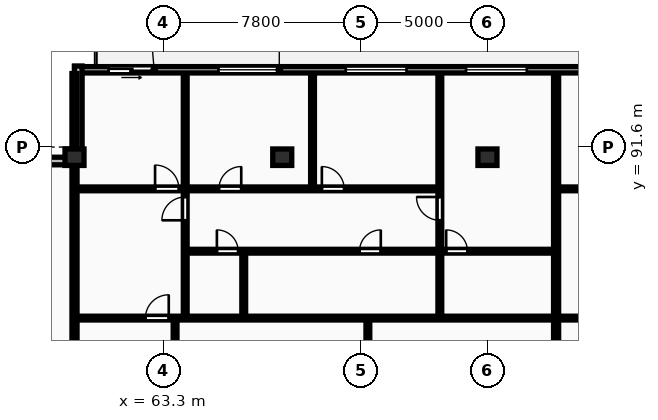
"""IFC4 building model, lengths in metres.
Left out: names, types, materials, properties, quantities, classifications, styles, units other than length and angle.
Written with IfcOpenShell. Run it as: python <this file> out.ifc"""

import sys

from ifc_helpers import new_model, si_unit, direction, frame, frame_2d, origin, origin_2d, place, context, subcontext, project, spatial, rectangle, extrude, element, fill, save


model = new_model("IFC4")
c1 = context("Model", 3, precision=1e-05, world=origin(), true_north=direction((0.0, 1.0)))
c2 = subcontext(c1, "Body", "Model", "MODEL_VIEW")
j1 = project(units=[si_unit("LENGTHUNIT", "METRE"), si_unit("PLANEANGLEUNIT", "RADIAN")], contexts=[c1])
p1 = place(None, origin())
s1 = spatial("IfcSite", under=j1, at=p1, CompositionType="ELEMENT")
p2 = place(p1, origin())
s2 = spatial("IfcBuilding", under=s1, at=p2, CompositionType="ELEMENT")
p3 = place(p2, frame((0.0, 0.0, 249.35)))
s3 = spatial("IfcBuildingStorey", under=s2, at=p3, CompositionType="ELEMENT", Elevation=249.35)
for number, where, z_axis, x_axis in (
    (1, (59.8, 91.2, 0.0), (0.0, 0.0, 1.0), (1.0, 0.0, 0.0)),
    (2, (68.0, 91.2, 0.0), (0.0, 0.0, 1.0), (1.0, 0.0, 0.0)),
    (3, (76.1, 91.2, 0.0), (0.0, 0.0, 1.0), (1.0, 0.0, 0.0)),
):
    element("IfcColumn", number, at=place(p3, frame(where, z_axis=z_axis, x_axis=x_axis)), inside=s3, PredefinedType="COLUMN", context=c2, shape_type="SweptSolid", body=[
        extrude(rectangle(XDim=0.75, YDim=0.65, at=origin_2d()), origin(), (0.0, 0.0, 1.0), 3.45),
    ])
p4 = place(p3, frame((128.4, 94.65, 0.0), z_axis=(0.0, 0.0, 1.0), x_axis=(-1.0, 0.0, 0.0)))
e4 = element("IfcWall", 4, at=p4, inside=s3, PredefinedType="STANDARD", context=c2, shape_type="SweptSolid", body=[
    extrude(rectangle(XDim=68.6, YDim=0.25, at=frame_2d((34.3, 0.0))), origin(), (0.0, 0.0, 1.0), 3.17),
])
p5 = place(p4, frame((60.518, 0.0, 0.85)))
e5 = element("IfcOpeningElement", 5, at=p5, cuts=e4, PredefinedType="OPENING", context=c2, shape_type="SweptSolid", body=[
    extrude(rectangle(XDim=2.4, YDim=1.9, at=frame_2d((1.2, 0.95))), frame((0.0, 0.135, 0.0), z_axis=(0.0, -1.0, 0.0), x_axis=(1.0, 0.0, 0.0)), (0.0, 0.0, 1.0), 0.27),
])
p6 = place(p4, frame((55.492, 0.0, 0.85)))
e6 = element("IfcOpeningElement", 6, at=p6, cuts=e4, PredefinedType="OPENING", context=c2, shape_type="SweptSolid", body=[
    extrude(rectangle(XDim=2.4, YDim=1.9, at=frame_2d((1.2, 0.95))), frame((0.0, 0.135, 0.0), z_axis=(0.0, -1.0, 0.0), x_axis=(1.0, 0.0, 0.0)), (0.0, 0.0, 1.0), 0.27),
])
p7 = place(p4, frame((65.455, 0.0, 0.0)))
e7 = element("IfcOpeningElement", 7, at=p7, cuts=e4, PredefinedType="OPENING", context=c2, shape_type="SweptSolid", body=[
    extrude(rectangle(XDim=1.8, YDim=2.2, at=frame_2d((0.9, 1.1))), frame((0.0, 0.135, 0.0), z_axis=(0.0, -1.0, 0.0), x_axis=(1.0, 0.0, 0.0)), (0.0, 0.0, 1.0), 0.27),
])
p8 = place(p4, frame((50.746, 0.0, 0.85)))
e8 = element("IfcOpeningElement", 8, at=p8, cuts=e4, PredefinedType="OPENING", context=c2, shape_type="SweptSolid", body=[
    extrude(rectangle(XDim=2.4, YDim=1.9, at=frame_2d((1.2, 0.95))), frame((0.0, 0.135, 0.0), z_axis=(0.0, -1.0, 0.0), x_axis=(1.0, 0.0, 0.0)), (0.0, 0.0, 1.0), 0.27),
])
p9 = place(p4, frame((39.76, 0.0, 0.85)))
e9 = element("IfcOpeningElement", 9, at=p9, cuts=e4, PredefinedType="OPENING", context=c2, shape_type="SweptSolid", body=[
    extrude(rectangle(XDim=1.8, YDim=1.8, at=frame_2d((0.9, 0.9))), frame((0.0, 0.135, 0.0), z_axis=(0.0, -1.0, 0.0), x_axis=(1.0, 0.0, 0.0)), (0.0, 0.0, 1.0), 0.27),
])
p10 = place(p4, frame((37.04, 0.0, 0.85)))
e10 = element("IfcOpeningElement", 10, at=p10, cuts=e4, PredefinedType="OPENING", context=c2, shape_type="SweptSolid", body=[
    extrude(rectangle(XDim=1.8, YDim=1.8, at=frame_2d((0.9, 0.9))), frame((0.0, 0.135, 0.0), z_axis=(0.0, -1.0, 0.0), x_axis=(1.0, 0.0, 0.0)), (0.0, 0.0, 1.0), 0.27),
])
p11 = place(p4, frame((44.845, 0.0, 0.0)))
e11 = element("IfcOpeningElement", 11, at=p11, cuts=e4, PredefinedType="OPENING", context=c2, shape_type="SweptSolid", body=[
    extrude(rectangle(XDim=1.8, YDim=2.2, at=frame_2d((0.9, 1.1))), frame((0.0, 0.135, 0.0), z_axis=(0.0, -1.0, 0.0), x_axis=(1.0, 0.0, 0.0)), (0.0, 0.0, 1.0), 0.27),
])
p12 = place(p4, frame((33.056, 0.0, 0.85)))
e12 = element("IfcOpeningElement", 12, at=p12, cuts=e4, PredefinedType="OPENING", context=c2, shape_type="SweptSolid", body=[
    extrude(rectangle(XDim=2.4, YDim=1.9, at=frame_2d((1.2, 0.95))), frame((0.0, 0.135, 0.0), z_axis=(0.0, -1.0, 0.0), x_axis=(1.0, 0.0, 0.0)), (0.0, 0.0, 1.0), 0.27),
])
p13 = place(p4, frame((27.394, 0.0, 0.0)))
e13 = element("IfcOpeningElement", 13, at=p13, cuts=e4, PredefinedType="OPENING", context=c2, shape_type="SweptSolid", body=[
    extrude(rectangle(XDim=1.8, YDim=2.2, at=frame_2d((0.9, 1.1))), frame((0.0, 0.135, 0.0), z_axis=(0.0, -1.0, 0.0), x_axis=(1.0, 0.0, 0.0)), (0.0, 0.0, 1.0), 0.27),
])
p14 = place(p4, frame((18.879, 0.0, 0.85)))
e14 = element("IfcOpeningElement", 14, at=p14, cuts=e4, PredefinedType="OPENING", context=c2, shape_type="SweptSolid", body=[
    extrude(rectangle(XDim=2.4, YDim=1.9, at=frame_2d((1.2, 0.95))), frame((0.0, 0.135, 0.0), z_axis=(0.0, -1.0, 0.0), x_axis=(1.0, 0.0, 0.0)), (0.0, 0.0, 1.0), 0.27),
])
p15 = place(p4, frame((11.048, 0.0, 0.0)))
e15 = element("IfcOpeningElement", 15, at=p15, cuts=e4, PredefinedType="OPENING", context=c2, shape_type="SweptSolid", body=[
    extrude(rectangle(XDim=1.8, YDim=2.2, at=frame_2d((0.9, 1.1))), frame((0.0, 0.135, 0.0), z_axis=(0.0, -1.0, 0.0), x_axis=(1.0, 0.0, 0.0)), (0.0, 0.0, 1.0), 0.27),
])
p16 = place(p4, frame((3.298, 0.0, 0.85)))
e16 = element("IfcOpeningElement", 16, at=p16, cuts=e4, PredefinedType="OPENING", context=c2, shape_type="SweptSolid", body=[
    extrude(rectangle(XDim=2.4, YDim=1.9, at=frame_2d((1.2, 0.95))), frame((0.0, 0.135, 0.0), z_axis=(0.0, -1.0, 0.0), x_axis=(1.0, 0.0, 0.0)), (0.0, 0.0, 1.0), 0.27),
])
for number, where, z_axis, x_axis in (
    (17, (59.95, 94.8, 0.0), (0.0, 0.0, 1.0), (0.0, -1.0, 0.0)),
    (18, (59.8, 91.05, 0.0), (0.0, 0.0, 1.0), (-1.0, 0.0, 0.0)),
):
    element("IfcWall", number, at=place(p3, frame(where, z_axis=z_axis, x_axis=x_axis)), inside=s3, PredefinedType="STANDARD", context=c2, shape_type="SweptSolid", body=[
        extrude(rectangle(XDim=3.6, YDim=0.3, at=frame_2d((1.8, 0.0))), origin(), (0.0, 0.0, 1.0), 3.17),
    ])
p17 = place(p3, frame((59.8, 70.18, 0.0), z_axis=(0.0, 0.0, 1.0), x_axis=(0.0, 1.0, 0.0)))
e19 = element("IfcWall", 19, at=p17, inside=s3, PredefinedType="PARTITIONING", context=c2, shape_type="SweptSolid", body=[
    extrude(rectangle(XDim=24.32, YDim=0.2, at=frame_2d((12.16, 0.0))), origin(), (0.0, 0.0, 1.0), 2.477),
])
p18 = place(p3, frame((78.809, 70.18, 0.0), z_axis=(0.0, 0.0, 1.0), x_axis=(0.0, 1.0, 0.0)))
e20 = element("IfcWall", 20, at=p18, inside=s3, PredefinedType="PARTITIONING", context=c2, shape_type="SweptSolid", body=[
    extrude(rectangle(XDim=24.32, YDim=0.2, at=frame_2d((12.16, 0.0))), origin(), (0.0, 0.0, 1.0), 3.17),
])
p19 = place(p3, frame((71.379, 70.16, 0.0), z_axis=(0.0, 0.0, 1.0), x_axis=(0.0, 1.0, 0.0)))
e21 = element("IfcWall", 21, at=p19, inside=s3, PredefinedType="PARTITIONING", context=c2, shape_type="SweptSolid", body=[
    extrude(rectangle(XDim=14.65, YDim=0.15, at=frame_2d((7.325, 0.0))), origin(), (0.0, 0.0, 1.0), 3.17),
])
p20 = place(p19, frame((6.235, 0.0, 0.0)))
e22 = element("IfcOpeningElement", 22, at=p20, cuts=e21, PredefinedType="OPENING", context=c2, shape_type="SweptSolid", body=[
    extrude(rectangle(XDim=0.84, YDim=2.04, at=frame_2d((0.42, 1.02))), frame((0.0, 0.085, 0.0), z_axis=(0.0, -1.0, 0.0), x_axis=(1.0, 0.0, 0.0)), (0.0, 0.0, 1.0), 0.17),
])
p21 = place(p19, frame((7.575, 0.0, 0.0)))
e23 = element("IfcOpeningElement", 23, at=p21, cuts=e21, PredefinedType="OPENING", context=c2, shape_type="SweptSolid", body=[
    extrude(rectangle(XDim=0.88, YDim=2.06, at=frame_2d((0.44, 1.03))), frame((0.0, 0.085, 0.0), z_axis=(0.0, -1.0, 0.0), x_axis=(1.0, 0.0, 0.0)), (0.0, 0.0, 1.0), 0.17),
])
p22 = place(p3, frame((63.77, 70.16, 0.0), z_axis=(0.0, 0.0, 1.0), x_axis=(0.0, 1.0, 0.0)))
e24 = element("IfcWall", 24, at=p22, inside=s3, PredefinedType="PARTITIONING", context=c2, shape_type="SweptSolid", body=[
    extrude(rectangle(XDim=14.65, YDim=0.15, at=frame_2d((7.325, 0.0))), origin(), (0.0, 0.0, 1.0), 3.17),
])
p23 = place(p22, frame((6.195, 0.0, 0.0)))
e25 = element("IfcOpeningElement", 25, at=p23, cuts=e24, PredefinedType="OPENING", context=c2, shape_type="SweptSolid", body=[
    extrude(rectangle(XDim=0.88, YDim=2.06, at=frame_2d((0.44, 1.03))), frame((0.0, 0.085, 0.0), z_axis=(0.0, -1.0, 0.0), x_axis=(1.0, 0.0, 0.0)), (0.0, 0.0, 1.0), 0.17),
])
p24 = place(p3, frame((66.48, 84.89, 0.0), z_axis=(0.0, 0.0, 1.0), x_axis=(0.0, 1.0, 0.0)))
e26 = element("IfcWall", 26, at=p24, inside=s3, PredefinedType="PARTITIONING", context=c2, shape_type="SweptSolid", body=[
    extrude(rectangle(XDim=2.58, YDim=0.15, at=frame_2d((1.29, 0.0))), origin(), (0.0, 0.0, 1.0), 3.17),
])
p25 = place(p3, frame((69.195, 90.03, 0.0), z_axis=(0.0, 0.0, 1.0), x_axis=(0.0, 1.0, 0.0)))
e27 = element("IfcWall", 27, at=p25, inside=s3, PredefinedType="PARTITIONING", context=c2, shape_type="SweptSolid", body=[
    extrude(rectangle(XDim=4.47, YDim=0.15, at=frame_2d((2.235, 0.0))), origin(), (0.0, 0.0, 1.0), 3.17),
])
p26 = place(p3, frame((64.17, 84.89, 0.0), z_axis=(0.0, 0.0, 1.0), x_axis=(0.0, 1.0, 0.0)))
e28 = element("IfcWall", 28, at=p26, inside=s3, PredefinedType="PARTITIONING", context=c2, shape_type="SweptSolid", body=[
    extrude(rectangle(XDim=9.61, YDim=0.15, at=frame_2d((4.805, 0.0))), origin(), (0.0, 0.0, 1.0), 3.17),
])
p27 = place(p26, frame((3.82, 0.0, 0.0)))
e29 = element("IfcOpeningElement", 29, at=p27, cuts=e28, PredefinedType="OPENING", context=c2, shape_type="SweptSolid", body=[
    extrude(rectangle(XDim=0.92, YDim=2.08, at=frame_2d((0.46, 1.04))), frame((0.0, 0.085, 0.0), z_axis=(0.0, -1.0, 0.0), x_axis=(1.0, 0.0, 0.0)), (0.0, 0.0, 1.0), 0.17),
])
p28 = place(p3, frame((74.22, 84.89, 0.0), z_axis=(0.0, 0.0, 1.0), x_axis=(0.0, 1.0, 0.0)))
e30 = element("IfcWall", 30, at=p28, inside=s3, PredefinedType="PARTITIONING", context=c2, shape_type="SweptSolid", body=[
    extrude(rectangle(XDim=2.58, YDim=0.15, at=frame_2d((1.29, 0.0))), origin(), (0.0, 0.0, 1.0), 3.17),
])
p29 = place(p3, frame((74.22, 87.51, 0.0), z_axis=(0.0, 0.0, 1.0), x_axis=(0.0, 1.0, 0.0)))
e31 = element("IfcWall", 31, at=p29, inside=s3, PredefinedType="PARTITIONING", context=c2, shape_type="SweptSolid", body=[
    extrude(rectangle(XDim=6.99, YDim=0.15, at=frame_2d((3.495, 0.0))), origin(), (0.0, 0.0, 1.0), 3.17),
])
p30 = place(p29, frame((1.2, 0.0, 0.0)))
e32 = element("IfcOpeningElement", 32, at=p30, cuts=e31, PredefinedType="OPENING", context=c2, shape_type="SweptSolid", body=[
    extrude(rectangle(XDim=0.92, YDim=2.08, at=frame_2d((0.46, 1.04))), frame((0.0, 0.085, 0.0), z_axis=(0.0, -1.0, 0.0), x_axis=(1.0, 0.0, 0.0)), (0.0, 0.0, 1.0), 0.17),
])
p31 = place(p3, frame((64.21, 87.49, 0.0), z_axis=(0.0, 0.0, 1.0), x_axis=(1.0, 0.0, 0.0)))
e33 = element("IfcWall", 33, at=p31, inside=s3, PredefinedType="PARTITIONING", context=c2, shape_type="SweptSolid", body=[
    extrude(rectangle(XDim=14.519, YDim=0.15, at=frame_2d((7.26, 0.0))), origin(), (0.0, 0.0, 1.0), 3.17),
])
p32 = place(p31, frame((1.21, 0.0, 0.0)))
e34 = element("IfcOpeningElement", 34, at=p32, cuts=e33, PredefinedType="OPENING", context=c2, shape_type="SweptSolid", body=[
    extrude(rectangle(XDim=0.84, YDim=2.04, at=frame_2d((0.42, 1.02))), frame((0.0, 0.085, 0.0), z_axis=(0.0, -1.0, 0.0), x_axis=(1.0, 0.0, 0.0)), (0.0, 0.0, 1.0), 0.17),
])
p33 = place(p31, frame((6.84, 0.0, 0.0)))
e35 = element("IfcOpeningElement", 35, at=p33, cuts=e33, PredefinedType="OPENING", context=c2, shape_type="SweptSolid", body=[
    extrude(rectangle(XDim=0.84, YDim=2.04, at=frame_2d((0.42, 1.02))), frame((0.0, 0.085, 0.0), z_axis=(0.0, -1.0, 0.0), x_axis=(1.0, 0.0, 0.0)), (0.0, 0.0, 1.0), 0.17),
])
p34 = place(p31, frame((10.26, 0.0, 0.0)))
e36 = element("IfcOpeningElement", 36, at=p34, cuts=e33, PredefinedType="OPENING", context=c2, shape_type="SweptSolid", body=[
    extrude(rectangle(XDim=0.84, YDim=2.04, at=frame_2d((0.42, 1.02))), frame((0.0, 0.085, 0.0), z_axis=(0.0, -1.0, 0.0), x_axis=(1.0, 0.0, 0.0)), (0.0, 0.0, 1.0), 0.17),
])
p35 = place(p3, frame((59.88, 84.85, 0.0), z_axis=(0.0, 0.0, 1.0), x_axis=(1.0, 0.0, 0.0)))
e37 = element("IfcWall", 37, at=p35, inside=s3, PredefinedType="PARTITIONING", context=c2, shape_type="SweptSolid", body=[
    extrude(rectangle(XDim=18.849, YDim=0.15, at=frame_2d((9.425, 0.0))), origin(), (0.0, 0.0, 1.0), 3.17),
])
p36 = place(p35, frame((2.72, 0.0, 0.0)))
e38 = element("IfcOpeningElement", 38, at=p36, cuts=e37, PredefinedType="OPENING", context=c2, shape_type="SweptSolid", body=[
    extrude(rectangle(XDim=0.92, YDim=2.08, at=frame_2d((0.46, 1.04))), frame((0.0, 0.085, 0.0), z_axis=(0.0, -1.0, 0.0), x_axis=(1.0, 0.0, 0.0)), (0.0, 0.0, 1.0), 0.17),
])
p37 = place(p3, frame((59.88, 89.95, 0.0), z_axis=(0.0, 0.0, 1.0), x_axis=(1.0, 0.0, 0.0)))
e39 = element("IfcWall", 39, at=p37, inside=s3, PredefinedType="PARTITIONING", context=c2, shape_type="SweptSolid", body=[
    extrude(rectangle(XDim=14.34, YDim=0.15, at=frame_2d((7.17, 0.0))), origin(), (0.0, 0.0, 1.0), 3.17),
])
p38 = place(p37, frame((3.1, 0.0, 0.0)))
e40 = element("IfcOpeningElement", 40, at=p38, cuts=e39, PredefinedType="OPENING", context=c2, shape_type="SweptSolid", body=[
    extrude(rectangle(XDim=0.94, YDim=2.1, at=frame_2d((0.47, 1.05))), frame((0.0, 0.085, 0.0), z_axis=(0.0, -1.0, 0.0), x_axis=(1.0, 0.0, 0.0)), (0.0, 0.0, 1.0), 0.17),
])
p39 = place(p37, frame((5.622, 0.0, 0.0)))
e41 = element("IfcOpeningElement", 41, at=p39, cuts=e39, PredefinedType="OPENING", context=c2, shape_type="SweptSolid", body=[
    extrude(rectangle(XDim=0.88, YDim=2.06, at=frame_2d((0.44, 1.03))), frame((0.0, 0.085, 0.0), z_axis=(0.0, -1.0, 0.0), x_axis=(1.0, 0.0, 0.0)), (0.0, 0.0, 1.0), 0.17),
])
p40 = place(p37, frame((9.683, 0.0, 0.0)))
e42 = element("IfcOpeningElement", 42, at=p40, cuts=e39, PredefinedType="OPENING", context=c2, shape_type="SweptSolid", body=[
    extrude(rectangle(XDim=0.88, YDim=2.06, at=frame_2d((0.44, 1.03))), frame((0.0, 0.085, 0.0), z_axis=(0.0, -1.0, 0.0), x_axis=(1.0, 0.0, 0.0)), (0.0, 0.0, 1.0), 0.17),
])
p41 = place(p3, frame((78.889, 84.85, 0.0), z_axis=(0.0, 0.0, 1.0), x_axis=(1.0, 0.0, 0.0)))
e43 = element("IfcWall", 43, at=p41, inside=s3, PredefinedType="PARTITIONING", context=c2, shape_type="SweptSolid", body=[
    extrude(rectangle(XDim=17.619, YDim=0.15, at=frame_2d((8.81, 0.0))), origin(), (0.0, 0.0, 1.0), 3.17),
])
p42 = place(p41, frame((2.72, 0.0, 0.0)))
e44 = element("IfcOpeningElement", 44, at=p42, cuts=e43, PredefinedType="OPENING", context=c2, shape_type="SweptSolid", body=[
    extrude(rectangle(XDim=0.92, YDim=2.08, at=frame_2d((0.46, 1.04))), frame((0.0, 0.085, 0.0), z_axis=(0.0, -1.0, 0.0), x_axis=(1.0, 0.0, 0.0)), (0.0, 0.0, 1.0), 0.17),
])
p43 = place(p3, frame((78.889, 89.95, 0.0), z_axis=(0.0, 0.0, 1.0), x_axis=(1.0, 0.0, 0.0)))
e45 = element("IfcWall", 45, at=p43, inside=s3, PredefinedType="PARTITIONING", context=c2, shape_type="SweptSolid", body=[
    extrude(rectangle(XDim=12.931, YDim=0.15, at=frame_2d((6.465, 0.0))), origin(), (0.0, 0.0, 1.0), 3.17),
])
p44 = place(p43, frame((3.033, 0.0, 0.0)))
e46 = element("IfcOpeningElement", 46, at=p44, cuts=e45, PredefinedType="OPENING", context=c2, shape_type="SweptSolid", body=[
    extrude(rectangle(XDim=0.94, YDim=2.1, at=frame_2d((0.47, 1.05))), frame((0.0, 0.085, 0.0), z_axis=(0.0, -1.0, 0.0), x_axis=(1.0, 0.0, 0.0)), (0.0, 0.0, 1.0), 0.17),
])
p45 = place(p43, frame((7.711, 0.0, 0.0)))
e47 = element("IfcOpeningElement", 47, at=p45, cuts=e45, PredefinedType="OPENING", context=c2, shape_type="SweptSolid", body=[
    extrude(rectangle(XDim=0.88, YDim=2.06, at=frame_2d((0.44, 1.03))), frame((0.0, 0.085, 0.0), z_axis=(0.0, -1.0, 0.0), x_axis=(1.0, 0.0, 0.0)), (0.0, 0.0, 1.0), 0.17),
])
p46 = place(p43, frame((10.431, 0.0, 0.0)))
e48 = element("IfcOpeningElement", 48, at=p46, cuts=e45, PredefinedType="OPENING", context=c2, shape_type="SweptSolid", body=[
    extrude(rectangle(XDim=0.88, YDim=2.06, at=frame_2d((0.44, 1.03))), frame((0.0, 0.085, 0.0), z_axis=(0.0, -1.0, 0.0), x_axis=(1.0, 0.0, 0.0)), (0.0, 0.0, 1.0), 0.17),
])
p47 = place(p5, origin())
e49 = element("IfcWindow", 49, at=p47, inside=s3, PartitioningType="DOUBLE_PANEL_VERTICAL", PredefinedType="WINDOW", context=c2, shape_type="SweptSolid", body=[
    extrude(rectangle(XDim=2.4, YDim=1.9, at=frame_2d((1.2, 0.95))), frame((0.0, 0.03, 0.0), z_axis=(0.0, -1.0, 0.0), x_axis=(1.0, 0.0, 0.0)), (0.0, 0.0, 1.0), 0.06),
])
fill(e5, e49)
p48 = place(p6, origin())
e50 = element("IfcWindow", 50, at=p48, inside=s3, PartitioningType="DOUBLE_PANEL_VERTICAL", PredefinedType="WINDOW", context=c2, shape_type="SweptSolid", body=[
    extrude(rectangle(XDim=2.4, YDim=1.9, at=frame_2d((1.2, 0.95))), frame((0.0, 0.03, 0.0), z_axis=(0.0, -1.0, 0.0), x_axis=(1.0, 0.0, 0.0)), (0.0, 0.0, 1.0), 0.06),
])
fill(e6, e50)
p49 = place(p7, origin())
e51 = element("IfcDoor", 51, at=p49, inside=s3, OperationType="SLIDING_TO_LEFT", PredefinedType="DOOR", context=c2, shape_type="SweptSolid", body=[
    extrude(rectangle(XDim=1.8, YDim=2.2, at=frame_2d((0.9, 1.1))), frame((0.0, 0.025, 0.0), z_axis=(0.0, -1.0, 0.0), x_axis=(1.0, 0.0, 0.0)), (0.0, 0.0, 1.0), 0.05),
])
fill(e7, e51)
p50 = place(p8, origin())
e52 = element("IfcWindow", 52, at=p50, inside=s3, PartitioningType="DOUBLE_PANEL_VERTICAL", PredefinedType="WINDOW", context=c2, shape_type="SweptSolid", body=[
    extrude(rectangle(XDim=2.4, YDim=1.9, at=frame_2d((1.2, 0.95))), frame((0.0, 0.03, 0.0), z_axis=(0.0, -1.0, 0.0), x_axis=(1.0, 0.0, 0.0)), (0.0, 0.0, 1.0), 0.06),
])
fill(e8, e52)
p51 = place(p27, origin())
e53 = element("IfcDoor", 53, at=p51, inside=s3, OperationType="SINGLE_SWING_LEFT", PredefinedType="DOOR", context=c2, shape_type="SweptSolid", body=[
    extrude(rectangle(XDim=0.92, YDim=2.08, at=frame_2d((0.46, 1.04))), frame((0.0, 0.025, 0.0), z_axis=(0.0, -1.0, 0.0), x_axis=(1.0, 0.0, 0.0)), (0.0, 0.0, 1.0), 0.05),
])
fill(e29, e53)
p52 = place(p30, origin())
e54 = element("IfcDoor", 54, at=p52, inside=s3, OperationType="SINGLE_SWING_RIGHT", PredefinedType="DOOR", context=c2, shape_type="SweptSolid", body=[
    extrude(rectangle(XDim=0.92, YDim=2.08, at=frame_2d((0.46, 1.04))), frame((0.0, 0.025, 0.0), z_axis=(0.0, -1.0, 0.0), x_axis=(1.0, 0.0, 0.0)), (0.0, 0.0, 1.0), 0.05),
])
fill(e32, e54)
p53 = place(p32, origin())
e55 = element("IfcDoor", 55, at=p53, inside=s3, OperationType="SINGLE_SWING_LEFT", PredefinedType="DOOR", context=c2, shape_type="SweptSolid", body=[
    extrude(rectangle(XDim=0.84, YDim=2.04, at=frame_2d((0.42, 1.02))), frame((0.0, 0.025, 0.0), z_axis=(0.0, -1.0, 0.0), x_axis=(1.0, 0.0, 0.0)), (0.0, 0.0, 1.0), 0.05),
])
fill(e34, e55)
p54 = place(p33, origin())
e56 = element("IfcDoor", 56, at=p54, inside=s3, OperationType="SINGLE_SWING_RIGHT", PredefinedType="DOOR", context=c2, shape_type="SweptSolid", body=[
    extrude(rectangle(XDim=0.84, YDim=2.04, at=frame_2d((0.42, 1.02))), frame((0.0, 0.025, 0.0), z_axis=(0.0, -1.0, 0.0), x_axis=(1.0, 0.0, 0.0)), (0.0, 0.0, 1.0), 0.05),
])
fill(e35, e56)
p55 = place(p34, origin())
e57 = element("IfcDoor", 57, at=p55, inside=s3, OperationType="SINGLE_SWING_LEFT", PredefinedType="DOOR", context=c2, shape_type="SweptSolid", body=[
    extrude(rectangle(XDim=0.84, YDim=2.04, at=frame_2d((0.42, 1.02))), frame((0.0, 0.025, 0.0), z_axis=(0.0, -1.0, 0.0), x_axis=(1.0, 0.0, 0.0)), (0.0, 0.0, 1.0), 0.05),
])
fill(e36, e57)
p56 = place(p36, origin())
e58 = element("IfcDoor", 58, at=p56, inside=s3, OperationType="SINGLE_SWING_RIGHT", PredefinedType="DOOR", context=c2, shape_type="SweptSolid", body=[
    extrude(rectangle(XDim=0.92, YDim=2.08, at=frame_2d((0.46, 1.04))), frame((0.0, 0.025, 0.0), z_axis=(0.0, -1.0, 0.0), x_axis=(1.0, 0.0, 0.0)), (0.0, 0.0, 1.0), 0.05),
])
fill(e38, e58)
p57 = place(p38, origin())
e59 = element("IfcDoor", 59, at=p57, inside=s3, OperationType="SINGLE_SWING_LEFT", PredefinedType="DOOR", context=c2, shape_type="SweptSolid", body=[
    extrude(rectangle(XDim=0.94, YDim=2.1, at=frame_2d((0.47, 1.05))), frame((0.0, 0.025, 0.0), z_axis=(0.0, -1.0, 0.0), x_axis=(1.0, 0.0, 0.0)), (0.0, 0.0, 1.0), 0.05),
])
fill(e40, e59)
p58 = place(p39, origin())
e60 = element("IfcDoor", 60, at=p58, inside=s3, OperationType="SINGLE_SWING_RIGHT", PredefinedType="DOOR", context=c2, shape_type="SweptSolid", body=[
    extrude(rectangle(XDim=0.88, YDim=2.06, at=frame_2d((0.44, 1.03))), frame((0.0, 0.025, 0.0), z_axis=(0.0, -1.0, 0.0), x_axis=(1.0, 0.0, 0.0)), (0.0, 0.0, 1.0), 0.05),
])
fill(e41, e60)
p59 = place(p40, origin())
e61 = element("IfcDoor", 61, at=p59, inside=s3, OperationType="SINGLE_SWING_LEFT", PredefinedType="DOOR", context=c2, shape_type="SweptSolid", body=[
    extrude(rectangle(XDim=0.88, YDim=2.06, at=frame_2d((0.44, 1.03))), frame((0.0, 0.025, 0.0), z_axis=(0.0, -1.0, 0.0), x_axis=(1.0, 0.0, 0.0)), (0.0, 0.0, 1.0), 0.05),
])
fill(e42, e61)
save(model, sys.argv[1])
